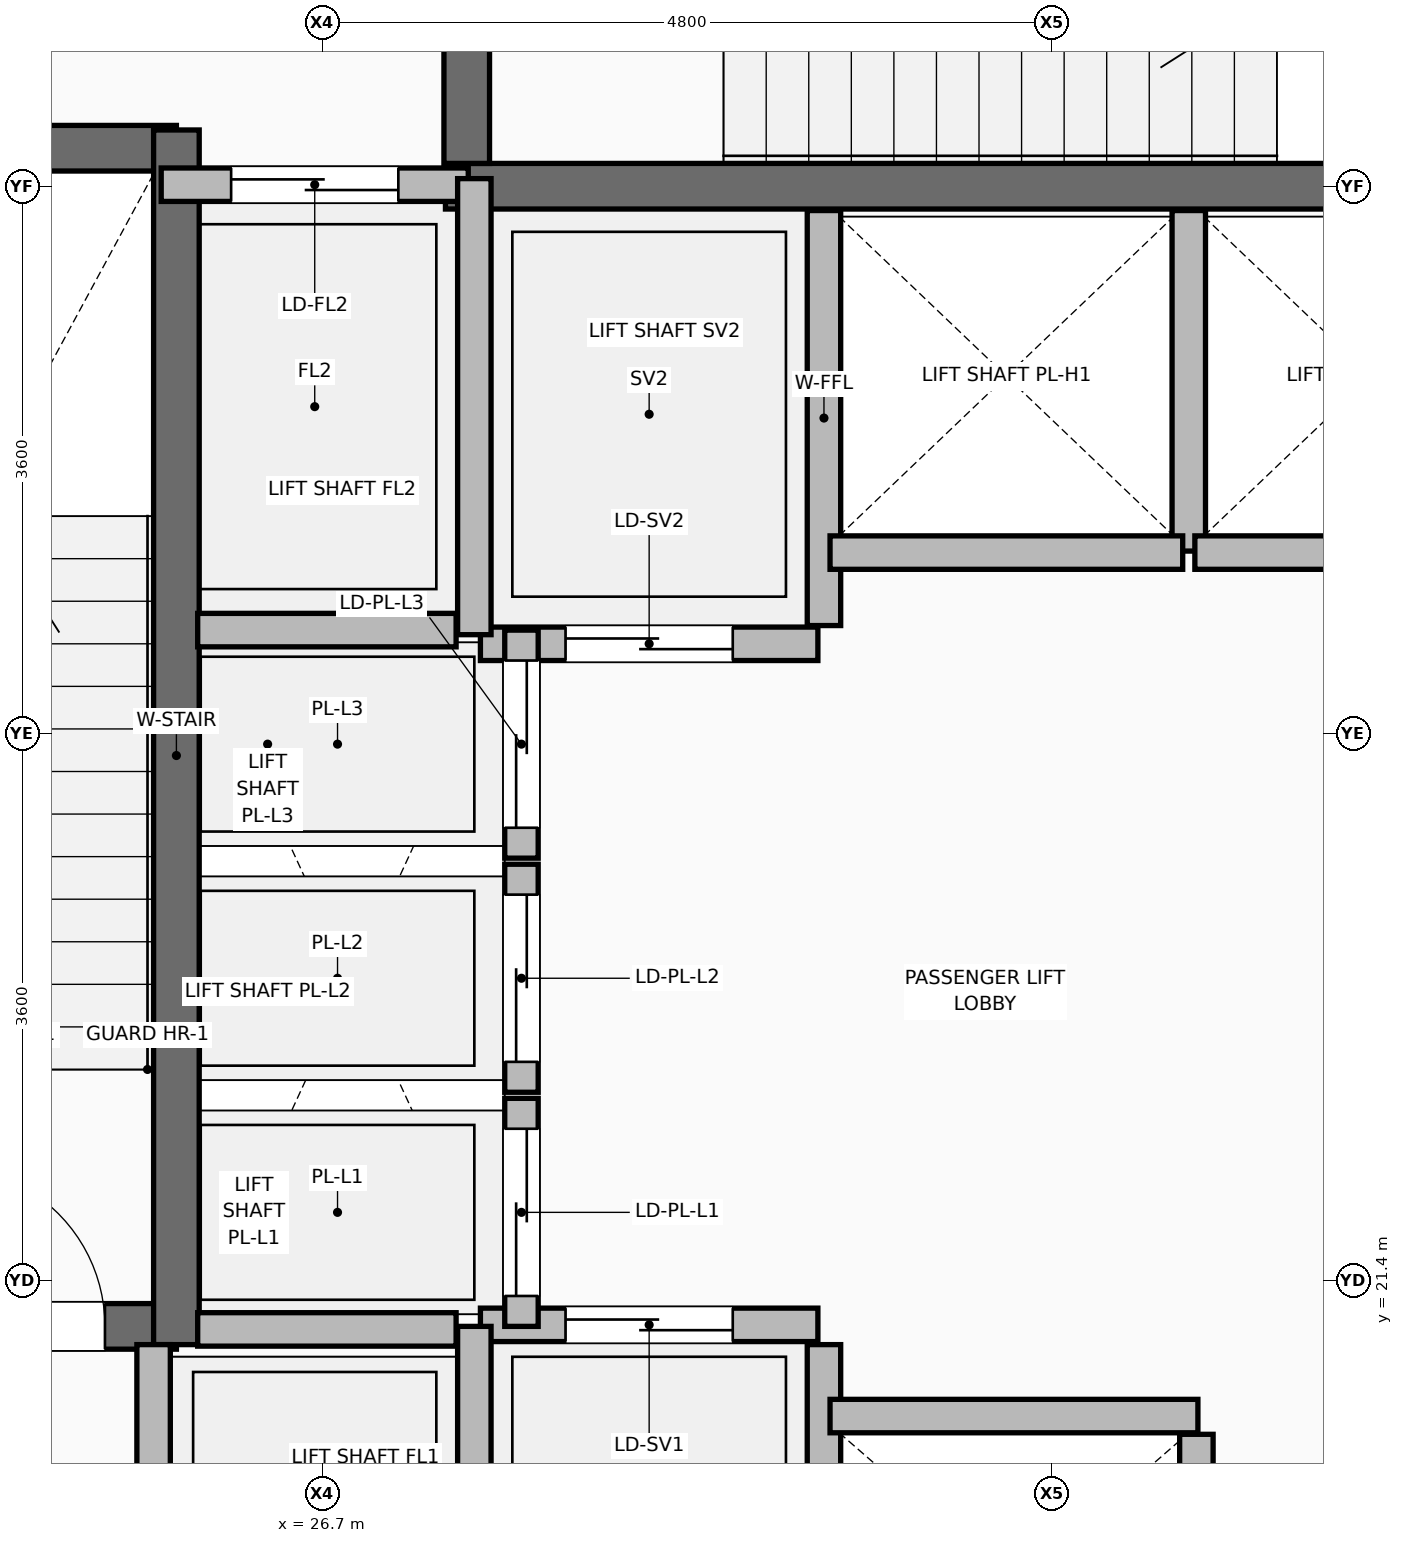
"""IFC4 building model, lengths in metres.
Left out: names, types, materials, properties, quantities, classifications, styles, units other than length and angle.
Written with IfcOpenShell. Run it as: python <this file> out.ifc"""

import sys

from ifc_helpers import new_model, si_unit, direction, frame, frame_2d, origin, place, context, subcontext, project, spatial, rectangle, extrude, element, fill, save


model = new_model("IFC4")
c1 = context("Model", 3, precision=1e-05, world=origin(), true_north=direction((0.0, 1.0)))
c2 = subcontext(c1, "Body", "Model", "MODEL_VIEW")
j1 = project(units=[si_unit("LENGTHUNIT", "METRE"), si_unit("PLANEANGLEUNIT", "RADIAN")], contexts=[c1])
p1 = place(None, origin())
s1 = spatial("IfcSite", under=j1, at=p1, CompositionType="ELEMENT")
p2 = place(p1, origin())
s2 = spatial("IfcBuilding", under=s1, at=p2, CompositionType="ELEMENT")
p3 = place(p2, frame((0.0, 0.0, 11.0)))
s3 = spatial("IfcBuildingStorey", under=s2, at=p3, CompositionType="ELEMENT", Elevation=11.0)
p4 = place(p3, frame((30.0, 18.08, 0.0), z_axis=(0.0, 0.0, 1.0), x_axis=(0.0, 1.0, 0.0)))
e1 = element("IfcWall", 1, at=p4, inside=s3, PredefinedType="PARTITIONING", context=c2, shape_type="SweptSolid", body=[
    extrude(rectangle(XDim=2.9, YDim=0.22, at=frame_2d((1.45, 0.0))), origin(), (0.0, 0.0, 1.0), 4.795),
])
p5 = place(p3, frame((32.45, 17.92, 0.0), z_axis=(0.0, 0.0, 1.0), x_axis=(0.0, 1.0, 0.0)))
e2 = element("IfcWall", 2, at=p5, inside=s3, PredefinedType="PARTITIONING", context=c2, shape_type="SweptSolid", body=[
    extrude(rectangle(XDim=2.47, YDim=0.22, at=frame_2d((1.235, 0.0))), origin(), (0.0, 0.0, 1.0), 4.178),
])
p6 = place(p3, frame((30.0, 25.71, 0.0), z_axis=(0.0, 0.0, 1.0), x_axis=(0.0, 1.0, 0.0)))
e3 = element("IfcWall", 3, at=p6, inside=s3, PredefinedType="PARTITIONING", context=c2, shape_type="SweptSolid", body=[
    extrude(rectangle(XDim=2.73, YDim=0.22, at=frame_2d((1.365, 0.0))), origin(), (0.0, 0.0, 1.0), 4.795),
])
p7 = place(p3, frame((32.4, 26.2, 0.0), z_axis=(0.0, 0.0, 1.0), x_axis=(0.0, 1.0, 0.0)))
e4 = element("IfcWall", 4, at=p7, inside=s3, PredefinedType="PARTITIONING", context=c2, shape_type="SweptSolid", body=[
    extrude(rectangle(XDim=2.24, YDim=0.22, at=frame_2d((1.12, 0.0))), origin(), (0.0, 0.0, 1.0), 4.795),
])
p8 = place(p3, frame((22.225, 21.1, 0.0), z_axis=(0.0, 0.0, 1.0), x_axis=(1.0, 0.0, 0.0)))
e5 = element("IfcWall", 5, at=p8, inside=s3, PredefinedType="SHEAR", context=c2, shape_type="SweptSolid", body=[
    extrude(rectangle(XDim=3.515, YDim=0.3, at=frame_2d((1.757, 0.0))), origin(), (0.0, 0.0, 1.0), 4.82),
])
p9 = place(p8, frame((1.995, 0.0, 0.0)))
e6 = element("IfcOpeningElement", 6, at=p9, cuts=e5, PredefinedType="OPENING", context=c2, shape_type="SweptSolid", body=[
    extrude(rectangle(XDim=1.05, YDim=2.1, at=frame_2d((0.525, 1.05))), frame((0.0, 0.16, 0.0), z_axis=(0.0, -1.0, 0.0), x_axis=(1.0, 0.0, 0.0)), (0.0, 0.0, 1.0), 0.32),
])
p10 = place(p3, frame((22.225, 28.85, 0.0), z_axis=(0.0, 0.0, 1.0), x_axis=(1.0, 0.0, 0.0)))
e7 = element("IfcWall", 7, at=p10, inside=s3, PredefinedType="SHEAR", context=c2, shape_type="SweptSolid", body=[
    extrude(rectangle(XDim=3.515, YDim=0.3, at=frame_2d((1.757, 0.0))), origin(), (0.0, 0.0, 1.0), 4.82),
])
p11 = place(p3, frame((25.74, 20.98, 0.0), z_axis=(0.0, 0.0, 1.0), x_axis=(0.0, 1.0, 0.0)))
e8 = element("IfcWall", 8, at=p11, inside=s3, PredefinedType="SHEAR", context=c2, shape_type="SweptSolid", body=[
    extrude(rectangle(XDim=7.99, YDim=0.3, at=frame_2d((3.995, 0.0))), origin(), (0.0, 0.0, 1.0), 4.82),
])
p12 = place(p3, frame((27.51, 28.6, 0.0), z_axis=(0.0, 0.0, 1.0), x_axis=(1.0, 0.0, 0.0)))
e9 = element("IfcWall", 9, at=p12, inside=s3, PredefinedType="SHEAR", context=c2, shape_type="SweptSolid", body=[
    extrude(rectangle(XDim=8.03, YDim=0.3, at=frame_2d((4.015, 0.0))), origin(), (0.0, 0.0, 1.0), 4.82),
])
p13 = place(p3, frame((27.65, 28.75, 0.0), z_axis=(0.0, 0.0, 1.0), x_axis=(0.0, 1.0, 0.0)))
e10 = element("IfcWall", 10, at=p13, inside=s3, PredefinedType="SHEAR", context=c2, shape_type="SweptSolid", body=[
    extrude(rectangle(XDim=3.375, YDim=0.3, at=frame_2d((1.688, 0.0))), origin(), (0.0, 0.0, 1.0), 4.82),
])
p14 = place(p13, frame((1.0, 0.0, 0.0)))
e11 = element("IfcOpeningElement", 11, at=p14, cuts=e10, PredefinedType="OPENING", context=c2, shape_type="SweptSolid", body=[
    extrude(rectangle(XDim=1.05, YDim=2.1, at=frame_2d((0.525, 1.05))), frame((0.0, 0.16, 0.0), z_axis=(0.0, -1.0, 0.0), x_axis=(1.0, 0.0, 0.0)), (0.0, 0.0, 1.0), 0.32),
])
p15 = place(p3, frame((25.59, 18.22, 0.0), z_axis=(0.0, 0.0, 1.0), x_axis=(0.0, 1.0, 0.0)))
e12 = element("IfcWall", 12, at=p15, inside=s3, PredefinedType="PARTITIONING", context=c2, shape_type="SweptSolid", body=[
    extrude(rectangle(XDim=2.76, YDim=0.22, at=frame_2d((1.38, 0.0))), origin(), (0.0, 0.0, 1.0), 4.8),
])
p16 = place(p15, frame((0.83, 0.0, 0.0)))
e13 = element("IfcOpeningElement", 13, at=p16, cuts=e12, PredefinedType="OPENING", context=c2, shape_type="SweptSolid", body=[
    extrude(rectangle(XDim=1.1, YDim=2.2, at=frame_2d((0.55, 1.1))), frame((0.0, 0.12, 0.0), z_axis=(0.0, -1.0, 0.0), x_axis=(1.0, 0.0, 0.0)), (0.0, 0.0, 1.0), 0.24),
])
p17 = place(p3, frame((25.64, 28.61, 0.0), z_axis=(0.0, 0.0, 1.0), x_axis=(1.0, 0.0, 0.0)))
e14 = element("IfcWall", 14, at=p17, inside=s3, PredefinedType="PARTITIONING", context=c2, shape_type="SweptSolid", body=[
    extrude(rectangle(XDim=2.02, YDim=0.22, at=frame_2d((1.01, 0.0))), origin(), (0.0, 0.0, 1.0), 4.8),
])
p18 = place(p17, frame((0.46, 0.0, 0.0)))
e15 = element("IfcOpeningElement", 15, at=p18, cuts=e14, PredefinedType="OPENING", context=c2, shape_type="SweptSolid", body=[
    extrude(rectangle(XDim=1.1, YDim=2.2, at=frame_2d((0.55, 1.1))), frame((0.0, 0.12, 0.0), z_axis=(0.0, -1.0, 0.0), x_axis=(1.0, 0.0, 0.0)), (0.0, 0.0, 1.0), 0.24),
])
p19 = place(p3, frame((27.74, 21.11, 0.0), z_axis=(0.0, 0.0, 1.0), x_axis=(1.0, 0.0, 0.0)))
e16 = element("IfcWall", 16, at=p19, inside=s3, PredefinedType="PARTITIONING", context=c2, shape_type="SweptSolid", body=[
    extrude(rectangle(XDim=2.22, YDim=0.22, at=frame_2d((1.11, 0.0))), origin(), (0.0, 0.0, 1.0), 4.8),
])
p20 = place(p19, frame((0.56, 0.0, 0.0)))
e17 = element("IfcOpeningElement", 17, at=p20, cuts=e16, PredefinedType="OPENING", context=c2, shape_type="SweptSolid", body=[
    extrude(rectangle(XDim=1.1, YDim=2.2, at=frame_2d((0.55, 1.1))), frame((0.0, 0.12, 0.0), z_axis=(0.0, -1.0, 0.0), x_axis=(1.0, 0.0, 0.0)), (0.0, 0.0, 1.0), 0.24),
])
p21 = place(p3, frame((27.74, 25.59, 0.0), z_axis=(0.0, 0.0, 1.0), x_axis=(1.0, 0.0, 0.0)))
e18 = element("IfcWall", 18, at=p21, inside=s3, PredefinedType="PARTITIONING", context=c2, shape_type="SweptSolid", body=[
    extrude(rectangle(XDim=2.22, YDim=0.22, at=frame_2d((1.11, 0.0))), origin(), (0.0, 0.0, 1.0), 4.8),
])
p22 = place(p21, frame((0.56, 0.0, 0.0)))
e19 = element("IfcOpeningElement", 19, at=p22, cuts=e18, PredefinedType="OPENING", context=c2, shape_type="SweptSolid", body=[
    extrude(rectangle(XDim=1.1, YDim=2.2, at=frame_2d((0.55, 1.1))), frame((0.0, 0.12, 0.0), z_axis=(0.0, -1.0, 0.0), x_axis=(1.0, 0.0, 0.0)), (0.0, 0.0, 1.0), 0.24),
])
p23 = place(p3, frame((30.04, 20.51, 0.0), z_axis=(0.0, 0.0, 1.0), x_axis=(1.0, 0.0, 0.0)))
e20 = element("IfcWall", 20, at=p23, inside=s3, PredefinedType="PARTITIONING", context=c2, shape_type="SweptSolid", body=[
    extrude(rectangle(XDim=2.42, YDim=0.22, at=frame_2d((1.21, 0.0))), origin(), (0.0, 0.0, 1.0), 4.8),
])
for number, where, z_axis, x_axis in (
    (21, (30.04, 26.19, 0.0), (0.0, 0.0, 1.0), (1.0, 0.0, 0.0)),
    (22, (32.44, 26.19, 0.0), (0.0, 0.0, 1.0), (1.0, 0.0, 0.0)),
):
    element("IfcWall", number, at=place(p3, frame(where, z_axis=z_axis, x_axis=x_axis)), inside=s3, PredefinedType="PARTITIONING", context=c2, shape_type="SweptSolid", body=[
        extrude(rectangle(XDim=2.32, YDim=0.22, at=frame_2d((1.16, 0.0))), origin(), (0.0, 0.0, 1.0), 4.8),
    ])
p24 = place(p3, frame((28.01, 21.1, 0.0), z_axis=(0.0, 0.0, 1.0), x_axis=(0.0, 1.0, 0.0)))
e23 = element("IfcWall", 23, at=p24, inside=s3, PredefinedType="PARTITIONING", context=c2, shape_type="SweptSolid", body=[
    extrude(rectangle(XDim=1.5, YDim=0.22, at=frame_2d((0.75, 0.0))), origin(), (0.0, 0.0, 1.0), 4.8),
])
p25 = place(p24, frame((0.2, 0.0, 0.0)))
e24 = element("IfcOpeningElement", 24, at=p25, cuts=e23, PredefinedType="OPENING", context=c2, shape_type="SweptSolid", body=[
    extrude(rectangle(XDim=1.1, YDim=2.2, at=frame_2d((0.55, 1.1))), frame((0.0, 0.12, 0.0), z_axis=(0.0, -1.0, 0.0), x_axis=(1.0, 0.0, 0.0)), (0.0, 0.0, 1.0), 0.24),
])
p26 = place(p3, frame((28.01, 22.64, 0.0), z_axis=(0.0, 0.0, 1.0), x_axis=(0.0, 1.0, 0.0)))
e25 = element("IfcWall", 25, at=p26, inside=s3, PredefinedType="PARTITIONING", context=c2, shape_type="SweptSolid", body=[
    extrude(rectangle(XDim=1.5, YDim=0.22, at=frame_2d((0.75, 0.0))), origin(), (0.0, 0.0, 1.0), 4.8),
])
p27 = place(p26, frame((0.2, 0.0, 0.0)))
e26 = element("IfcOpeningElement", 26, at=p27, cuts=e25, PredefinedType="OPENING", context=c2, shape_type="SweptSolid", body=[
    extrude(rectangle(XDim=1.1, YDim=2.2, at=frame_2d((0.55, 1.1))), frame((0.0, 0.12, 0.0), z_axis=(0.0, -1.0, 0.0), x_axis=(1.0, 0.0, 0.0)), (0.0, 0.0, 1.0), 0.24),
])
p28 = place(p3, frame((28.01, 24.18, 0.0), z_axis=(0.0, 0.0, 1.0), x_axis=(0.0, 1.0, 0.0)))
e27 = element("IfcWall", 27, at=p28, inside=s3, PredefinedType="PARTITIONING", context=c2, shape_type="SweptSolid", body=[
    extrude(rectangle(XDim=1.5, YDim=0.22, at=frame_2d((0.75, 0.0))), origin(), (0.0, 0.0, 1.0), 4.8),
])
p29 = place(p28, frame((0.2, 0.0, 0.0)))
e28 = element("IfcOpeningElement", 28, at=p29, cuts=e27, PredefinedType="OPENING", context=c2, shape_type="SweptSolid", body=[
    extrude(rectangle(XDim=1.1, YDim=2.2, at=frame_2d((0.55, 1.1))), frame((0.0, 0.12, 0.0), z_axis=(0.0, -1.0, 0.0), x_axis=(1.0, 0.0, 0.0)), (0.0, 0.0, 1.0), 0.24),
])
p30 = place(p3, frame((27.7, 18.15, 0.0), z_axis=(0.0, 0.0, 1.0), x_axis=(0.0, 1.0, 0.0)))
e29 = element("IfcWall", 29, at=p30, inside=s3, PredefinedType="PARTITIONING", context=c2, shape_type="SweptSolid", body=[
    extrude(rectangle(XDim=2.95, YDim=0.22, at=frame_2d((1.475, 0.0))), origin(), (0.0, 0.0, 1.0), 4.8),
])
p31 = place(p3, frame((27.7, 25.65, 0.0), z_axis=(0.0, 0.0, 1.0), x_axis=(0.0, 1.0, 0.0)))
e30 = element("IfcWall", 30, at=p31, inside=s3, PredefinedType="PARTITIONING", context=c2, shape_type="SweptSolid", body=[
    extrude(rectangle(XDim=3.0, YDim=0.22, at=frame_2d((1.5, 0.0))), origin(), (0.0, 0.0, 1.0), 4.8),
])
for number, where, z_axis, x_axis in (
    (31, (25.88, 21.08, 0.0), (0.0, 0.0, 1.0), (1.0, 0.0, 0.0)),
    (32, (25.88, 25.68, 0.0), (0.0, 0.0, 1.0), (1.0, 0.0, 0.0)),
):
    element("IfcWall", number, at=place(p3, frame(where, z_axis=z_axis, x_axis=x_axis)), inside=s3, PredefinedType="PARTITIONING", context=c2, shape_type="SweptSolid", body=[
        extrude(rectangle(XDim=1.7, YDim=0.22, at=frame_2d((0.85, 0.0))), origin(), (0.0, 0.0, 1.0), 4.8),
    ])
p32 = place(p9, origin())
e33 = element("IfcDoor", 33, at=p32, inside=s3, OperationType="SINGLE_SWING_LEFT", PredefinedType="DOOR", context=c2, shape_type="SweptSolid", body=[
    extrude(rectangle(XDim=1.05, YDim=2.1, at=frame_2d((0.525, 1.05))), frame((0.0, 0.025, 0.0), z_axis=(0.0, -1.0, 0.0), x_axis=(1.0, 0.0, 0.0)), (0.0, 0.0, 1.0), 0.05),
])
fill(e6, e33)
p33 = place(p18, origin())
e34 = element("IfcDoor", 34, at=p33, inside=s3, OperationType="DOUBLE_DOOR_SLIDING", PredefinedType="DOOR", context=c2, shape_type="SweptSolid", body=[
    extrude(rectangle(XDim=1.1, YDim=2.2, at=frame_2d((0.55, 1.1))), frame((0.0, 0.025, 0.0), z_axis=(0.0, -1.0, 0.0), x_axis=(1.0, 0.0, 0.0)), (0.0, 0.0, 1.0), 0.05),
])
fill(e15, e34)
p34 = place(p20, origin())
e35 = element("IfcDoor", 35, at=p34, inside=s3, OperationType="DOUBLE_DOOR_SLIDING", PredefinedType="DOOR", context=c2, shape_type="SweptSolid", body=[
    extrude(rectangle(XDim=1.1, YDim=2.2, at=frame_2d((0.55, 1.1))), frame((0.0, 0.025, 0.0), z_axis=(0.0, -1.0, 0.0), x_axis=(1.0, 0.0, 0.0)), (0.0, 0.0, 1.0), 0.05),
])
fill(e17, e35)
p35 = place(p22, frame((1.1, 0.0, 0.0), z_axis=(0.0, 0.0, 1.0), x_axis=(-1.0, 0.0, 0.0)))
e36 = element("IfcDoor", 36, at=p35, inside=s3, OperationType="DOUBLE_DOOR_SLIDING", PredefinedType="DOOR", context=c2, shape_type="SweptSolid", body=[
    extrude(rectangle(XDim=1.1, YDim=2.2, at=frame_2d((0.55, 1.1))), frame((0.0, 0.025, 0.0), z_axis=(0.0, -1.0, 0.0), x_axis=(1.0, 0.0, 0.0)), (0.0, 0.0, 1.0), 0.05),
])
fill(e19, e36)
p36 = place(p25, frame((1.1, 0.0, 0.0), z_axis=(0.0, 0.0, 1.0), x_axis=(-1.0, 0.0, 0.0)))
e37 = element("IfcDoor", 37, at=p36, inside=s3, OperationType="DOUBLE_DOOR_SLIDING", PredefinedType="DOOR", context=c2, shape_type="SweptSolid", body=[
    extrude(rectangle(XDim=1.1, YDim=2.2, at=frame_2d((0.55, 1.1))), frame((0.0, 0.025, 0.0), z_axis=(0.0, -1.0, 0.0), x_axis=(1.0, 0.0, 0.0)), (0.0, 0.0, 1.0), 0.05),
])
fill(e24, e37)
p37 = place(p27, frame((1.1, 0.0, 0.0), z_axis=(0.0, 0.0, 1.0), x_axis=(-1.0, 0.0, 0.0)))
e38 = element("IfcDoor", 38, at=p37, inside=s3, OperationType="DOUBLE_DOOR_SLIDING", PredefinedType="DOOR", context=c2, shape_type="SweptSolid", body=[
    extrude(rectangle(XDim=1.1, YDim=2.2, at=frame_2d((0.55, 1.1))), frame((0.0, 0.025, 0.0), z_axis=(0.0, -1.0, 0.0), x_axis=(1.0, 0.0, 0.0)), (0.0, 0.0, 1.0), 0.05),
])
fill(e26, e38)
p38 = place(p29, frame((1.1, 0.0, 0.0), z_axis=(0.0, 0.0, 1.0), x_axis=(-1.0, 0.0, 0.0)))
e39 = element("IfcDoor", 39, at=p38, inside=s3, OperationType="DOUBLE_DOOR_SLIDING", PredefinedType="DOOR", context=c2, shape_type="SweptSolid", body=[
    extrude(rectangle(XDim=1.1, YDim=2.2, at=frame_2d((0.55, 1.1))), frame((0.0, 0.025, 0.0), z_axis=(0.0, -1.0, 0.0), x_axis=(1.0, 0.0, 0.0)), (0.0, 0.0, 1.0), 0.05),
])
fill(e28, e39)
save(model, sys.argv[1])
